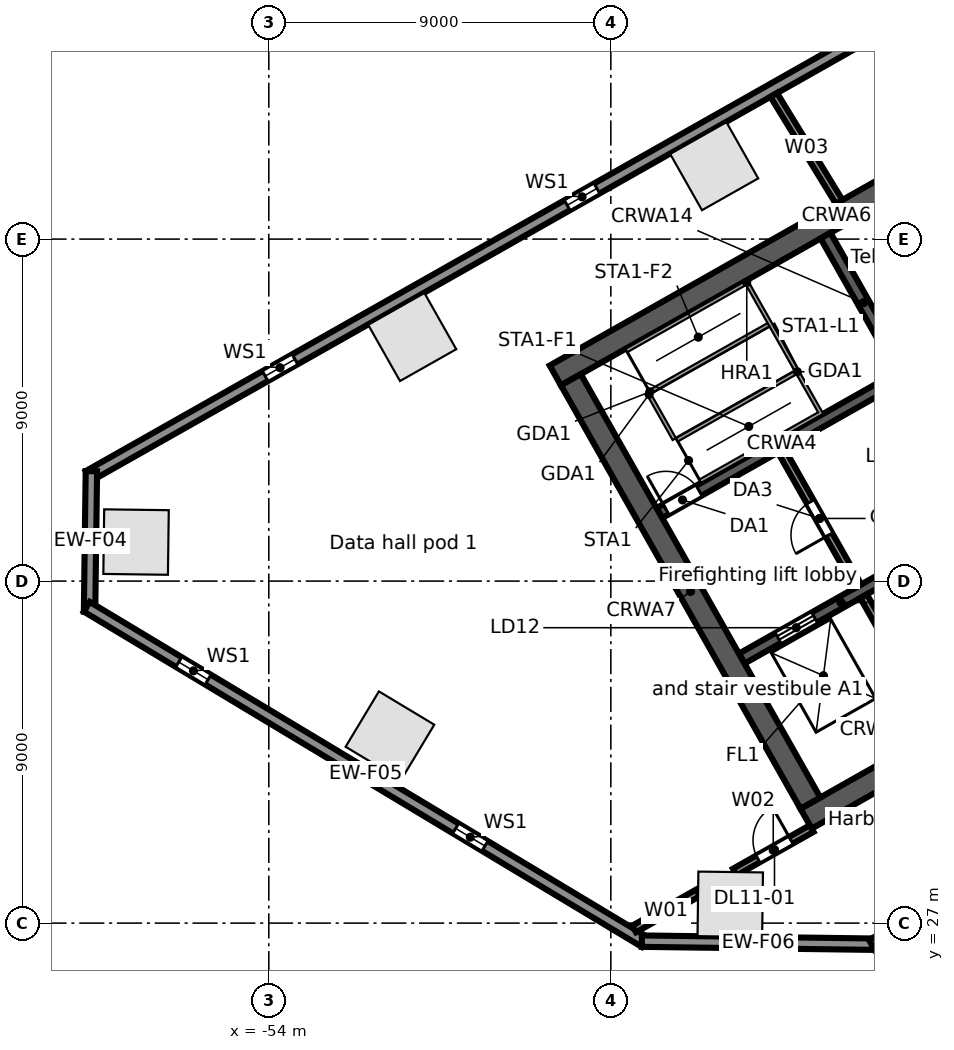
"""IFC4 building model, lengths in metres.
Left out: names, types, materials, properties, quantities, classifications, styles, units other than length and angle.
Written with IfcOpenShell. Run it as: python <this file> out.ifc"""

import sys

from ifc_helpers import new_model, si_unit, direction, frame, frame_2d, origin, origin_2d, place, context, subcontext, project, spatial, rectangle, extrude, element, fill, save


model = new_model("IFC4")
c1 = context("Model", 3, precision=1e-05, world=origin(), true_north=direction((0.0, 1.0)))
c2 = subcontext(c1, "Body", "Model", "MODEL_VIEW")
j1 = project(units=[si_unit("LENGTHUNIT", "METRE"), si_unit("PLANEANGLEUNIT", "RADIAN")], contexts=[c1])
p1 = place(None, origin())
s1 = spatial("IfcSite", under=j1, at=p1, CompositionType="ELEMENT")
p2 = place(p1, origin())
s2 = spatial("IfcBuilding", under=s1, at=p2, CompositionType="ELEMENT")
p3 = place(p2, frame((0.0, 0.0, 66.5)))
s3 = spatial("IfcBuildingStorey", under=s2, at=p3, CompositionType="ELEMENT", Elevation=66.5)
for number, where, z_axis, x_axis in (
    (1, (-42.28, 46.919, 0.0), (0.0, 0.0, 1.0), (-0.87, -0.492, 0.0)),
    (2, (-50.226, 42.423, 0.0), (0.0, 0.0, 1.0), (-0.87, -0.492, 0.0)),
    (3, (-57.493, 37.027, 0.0), (0.0, 0.0, 1.0), (-0.013, -1.0, 0.0)),
    (4, (-50.812, 31.931, 0.0), (0.0, 0.0, 1.0), (0.857, -0.515, 0.0)),
    (5, (-41.858, 27.495, 0.0), (0.0, 0.0, 1.0), (1.0, -0.013, 0.0)),
):
    element("IfcColumn", number, at=place(p3, frame(where, z_axis=z_axis, x_axis=x_axis)), inside=s3, PredefinedType="COLUMN", context=c2, shape_type="SweptSolid", body=[
        extrude(rectangle(XDim=1.7, YDim=1.7, at=origin_2d()), origin(), (0.0, 0.0, 1.0), 5.0),
    ])
p4 = place(p3, frame((-58.745, 38.764, 0.0), z_axis=(0.0, 0.0, 1.0), x_axis=(0.870355811726, 0.492423355453, 0.0)))
e6 = element("IfcWall", 6, at=p4, inside=s3, PredefinedType="STANDARD", context=c2, shape_type="SweptSolid", body=[
    extrude(rectangle(XDim=64.025, YDim=0.3, at=frame_2d((32.013, 0.0))), origin(), (0.0, 0.0, 1.0), 4.68),
])
p5 = place(p4, frame((60.122, 0.0, 0.6)))
e7 = element("IfcOpeningElement", 7, at=p5, cuts=e6, PredefinedType="OPENING", context=c2, shape_type="SweptSolid", body=[
    extrude(rectangle(XDim=0.9, YDim=3.2, at=frame_2d((0.45, 1.6))), frame((0.0, 0.16, 0.0), z_axis=(0.0, -1.0, 0.0), x_axis=(1.0, 0.0, 0.0)), (0.0, 0.0, 1.0), 0.32),
])
p6 = place(p4, frame((50.992, 0.0, 0.6)))
e8 = element("IfcOpeningElement", 8, at=p6, cuts=e6, PredefinedType="OPENING", context=c2, shape_type="SweptSolid", body=[
    extrude(rectangle(XDim=0.9, YDim=3.2, at=frame_2d((0.45, 1.6))), frame((0.0, 0.16, 0.0), z_axis=(0.0, -1.0, 0.0), x_axis=(1.0, 0.0, 0.0)), (0.0, 0.0, 1.0), 0.32),
])
p7 = place(p4, frame((41.862, 0.0, 0.6)))
e9 = element("IfcOpeningElement", 9, at=p7, cuts=e6, PredefinedType="OPENING", context=c2, shape_type="SweptSolid", body=[
    extrude(rectangle(XDim=0.9, YDim=3.2, at=frame_2d((0.45, 1.6))), frame((0.0, 0.16, 0.0), z_axis=(0.0, -1.0, 0.0), x_axis=(1.0, 0.0, 0.0)), (0.0, 0.0, 1.0), 0.32),
])
p8 = place(p4, frame((32.732, 0.0, 0.6)))
e10 = element("IfcOpeningElement", 10, at=p8, cuts=e6, PredefinedType="OPENING", context=c2, shape_type="SweptSolid", body=[
    extrude(rectangle(XDim=0.9, YDim=3.2, at=frame_2d((0.45, 1.6))), frame((0.0, 0.16, 0.0), z_axis=(0.0, -1.0, 0.0), x_axis=(1.0, 0.0, 0.0)), (0.0, 0.0, 1.0), 0.32),
])
p9 = place(p4, frame((23.602, 0.0, 0.6)))
e11 = element("IfcOpeningElement", 11, at=p9, cuts=e6, PredefinedType="OPENING", context=c2, shape_type="SweptSolid", body=[
    extrude(rectangle(XDim=0.9, YDim=3.2, at=frame_2d((0.45, 1.6))), frame((0.0, 0.16, 0.0), z_axis=(0.0, -1.0, 0.0), x_axis=(1.0, 0.0, 0.0)), (0.0, 0.0, 1.0), 0.32),
])
p10 = place(p4, frame((14.472, 0.0, 0.6)))
e12 = element("IfcOpeningElement", 12, at=p10, cuts=e6, PredefinedType="OPENING", context=c2, shape_type="SweptSolid", body=[
    extrude(rectangle(XDim=0.9, YDim=3.2, at=frame_2d((0.45, 1.6))), frame((0.0, 0.16, 0.0), z_axis=(0.0, -1.0, 0.0), x_axis=(1.0, 0.0, 0.0)), (0.0, 0.0, 1.0), 0.32),
])
p11 = place(p4, frame((5.342, 0.0, 0.6)))
e13 = element("IfcOpeningElement", 13, at=p11, cuts=e6, PredefinedType="OPENING", context=c2, shape_type="SweptSolid", body=[
    extrude(rectangle(XDim=0.9, YDim=3.2, at=frame_2d((0.45, 1.6))), frame((0.0, 0.16, 0.0), z_axis=(0.0, -1.0, 0.0), x_axis=(1.0, 0.0, 0.0)), (0.0, 0.0, 1.0), 0.32),
])
p12 = place(p3, frame((-58.717, 35.194, 0.0), z_axis=(0.0, 0.0, 1.0), x_axis=(0.013069053407, 0.999914596275, 0.0)))
e14 = element("IfcWall", 14, at=p12, inside=s3, PredefinedType="STANDARD", context=c2, shape_type="SweptSolid", body=[
    extrude(rectangle(XDim=3.699, YDim=0.3, at=frame_2d((1.849, 0.0))), origin(), (0.0, 0.0, 1.0), 4.68),
])
p13 = place(p3, frame((-44.109, 26.504, 0.0), z_axis=(0.0, 0.0, 1.0), x_axis=(-0.857169502585, 0.515034410344, 0.0)))
e15 = element("IfcWall", 15, at=p13, inside=s3, PredefinedType="STANDARD", context=c2, shape_type="SweptSolid", body=[
    extrude(rectangle(XDim=17.127, YDim=0.3, at=frame_2d((8.563, 0.0))), origin(), (0.0, 0.0, 1.0), 4.68),
])
p14 = place(p13, frame((13.403, 0.0, 0.6)))
e16 = element("IfcOpeningElement", 16, at=p14, cuts=e15, PredefinedType="OPENING", context=c2, shape_type="SweptSolid", body=[
    extrude(rectangle(XDim=0.9, YDim=3.2, at=frame_2d((0.45, 1.6))), frame((0.0, 0.16, 0.0), z_axis=(0.0, -1.0, 0.0), x_axis=(1.0, 0.0, 0.0)), (0.0, 0.0, 1.0), 0.32),
])
p15 = place(p13, frame((4.903, 0.0, 0.6)))
e17 = element("IfcOpeningElement", 17, at=p15, cuts=e15, PredefinedType="OPENING", context=c2, shape_type="SweptSolid", body=[
    extrude(rectangle(XDim=0.9, YDim=3.2, at=frame_2d((0.45, 1.6))), frame((0.0, 0.16, 0.0), z_axis=(0.0, -1.0, 0.0), x_axis=(1.0, 0.0, 0.0)), (0.0, 0.0, 1.0), 0.32),
])
p16 = place(p3, frame((-38.057, 26.445, 0.0), z_axis=(0.0, 0.0, 1.0), x_axis=(-0.999914086342, 0.013108010296, 0.0)))
e18 = element("IfcWall", 18, at=p16, inside=s3, PredefinedType="STANDARD", context=c2, shape_type="SweptSolid", body=[
    extrude(rectangle(XDim=6.128, YDim=0.3, at=frame_2d((3.064, 0.0))), origin(), (0.0, 0.0, 1.0), 4.68),
])
p17 = place(p3, frame((-0.055, 47.969, 0.0), z_axis=(0.0, 0.0, 1.0), x_axis=(-0.870355730478, -0.492423499058, 0.0)))
e19 = element("IfcWall", 19, at=p17, inside=s3, PredefinedType="STANDARD", context=c2, shape_type="SweptSolid", body=[
    extrude(rectangle(XDim=43.75, YDim=0.3, at=frame_2d((21.875, 0.0))), origin(), (0.0, 0.0, 1.0), 4.68),
])
p18 = place(p17, frame((39.977, 0.0, 0.6)))
e20 = element("IfcOpeningElement", 20, at=p18, cuts=e19, PredefinedType="OPENING", context=c2, shape_type="SweptSolid", body=[
    extrude(rectangle(XDim=0.9, YDim=3.2, at=frame_2d((0.45, 1.6))), frame((0.0, 0.16, 0.0), z_axis=(0.0, -1.0, 0.0), x_axis=(1.0, 0.0, 0.0)), (0.0, 0.0, 1.0), 0.32),
])
p19 = place(p17, frame((31.222, 0.0, 0.6)))
e21 = element("IfcOpeningElement", 21, at=p19, cuts=e19, PredefinedType="OPENING", context=c2, shape_type="SweptSolid", body=[
    extrude(rectangle(XDim=0.9, YDim=3.2, at=frame_2d((0.45, 1.6))), frame((0.0, 0.16, 0.0), z_axis=(0.0, -1.0, 0.0), x_axis=(1.0, 0.0, 0.0)), (0.0, 0.0, 1.0), 0.32),
])
p20 = place(p17, frame((22.468, 0.0, 0.6)))
e22 = element("IfcOpeningElement", 22, at=p20, cuts=e19, PredefinedType="OPENING", context=c2, shape_type="SweptSolid", body=[
    extrude(rectangle(XDim=0.9, YDim=3.2, at=frame_2d((0.45, 1.6))), frame((0.0, 0.16, 0.0), z_axis=(0.0, -1.0, 0.0), x_axis=(1.0, 0.0, 0.0)), (0.0, 0.0, 1.0), 0.32),
])
p21 = place(p17, frame((13.713, 0.0, 0.6)))
e23 = element("IfcOpeningElement", 23, at=p21, cuts=e19, PredefinedType="OPENING", context=c2, shape_type="SweptSolid", body=[
    extrude(rectangle(XDim=0.9, YDim=3.2, at=frame_2d((0.45, 1.6))), frame((0.0, 0.16, 0.0), z_axis=(0.0, -1.0, 0.0), x_axis=(1.0, 0.0, 0.0)), (0.0, 0.0, 1.0), 0.32),
])
p22 = place(p17, frame((4.959, 0.0, 0.6)))
e24 = element("IfcOpeningElement", 24, at=p22, cuts=e19, PredefinedType="OPENING", context=c2, shape_type="SweptSolid", body=[
    extrude(rectangle(XDim=0.9, YDim=3.2, at=frame_2d((0.45, 1.6))), frame((0.0, 0.16, 0.0), z_axis=(0.0, -1.0, 0.0), x_axis=(1.0, 0.0, 0.0)), (0.0, 0.0, 1.0), 0.32),
])
p23 = place(p3, frame((-39.862, 29.749, 0.0), z_axis=(0.0, 0.0, 1.0), x_axis=(0.870350116061, 0.492433422375, 0.0)))
e25 = element("IfcWall", 25, at=p23, inside=s3, PredefinedType="SOLIDWALL", context=c2, shape_type="SweptSolid", body=[
    extrude(rectangle(XDim=17.0, YDim=0.6, at=frame_2d((8.5, 0.0))), origin(), (0.0, 0.0, 1.0), 4.68),
])
p24 = place(p23, frame((7.2, 0.0, 0.0)))
e26 = element("IfcOpeningElement", 26, at=p24, cuts=e25, PredefinedType="OPENING", context=c2, shape_type="SweptSolid", body=[
    extrude(rectangle(XDim=1.2, YDim=2.1, at=frame_2d((0.6, 1.05))), frame((0.0, 0.31, 0.0), z_axis=(0.0, -1.0, 0.0), x_axis=(1.0, 0.0, 0.0)), (0.0, 0.0, 1.0), 0.62),
])
p25 = place(p3, frame((-41.556, 33.961, 0.0), z_axis=(0.0, 0.0, 1.0), x_axis=(0.870343731308, 0.492444706919, 0.0)))
e27 = element("IfcWall", 27, at=p25, inside=s3, PredefinedType="SOLIDWALL", context=c2, shape_type="SweptSolid", body=[
    extrude(rectangle(XDim=6.0, YDim=0.3, at=frame_2d((3.0, 0.0))), origin(), (0.0, 0.0, 1.0), 4.68),
])
p26 = place(p25, frame((1.1, 0.0, 0.0)))
e28 = element("IfcOpeningElement", 28, at=p26, cuts=e27, PredefinedType="OPENING", context=c2, shape_type="SweptSolid", body=[
    extrude(rectangle(XDim=1.1, YDim=2.1, at=frame_2d((0.55, 1.05))), frame((0.0, 0.16, 0.0), z_axis=(0.0, -1.0, 0.0), x_axis=(1.0, 0.0, 0.0)), (0.0, 0.0, 1.0), 0.32),
])
p27 = place(p25, frame((4.25, 0.0, 0.0)))
e29 = element("IfcOpeningElement", 29, at=p27, cuts=e27, PredefinedType="OPENING", context=c2, shape_type="SweptSolid", body=[
    extrude(rectangle(XDim=1.1, YDim=2.1, at=frame_2d((0.55, 1.05))), frame((0.0, 0.16, 0.0), z_axis=(0.0, -1.0, 0.0), x_axis=(1.0, 0.0, 0.0)), (0.0, 0.0, 1.0), 0.32),
])
p28 = place(p3, frame((-43.723, 37.791, 0.0), z_axis=(0.0, 0.0, 1.0), x_axis=(0.87035077051, 0.49243226567, 0.0)))
e30 = element("IfcWall", 30, at=p28, inside=s3, PredefinedType="SOLIDWALL", context=c2, shape_type="SweptSolid", body=[
    extrude(rectangle(XDim=7.4, YDim=0.3, at=frame_2d((3.7, 0.0))), origin(), (0.0, 0.0, 1.0), 4.68),
])
p29 = place(p28, frame((0.2, 0.0, 0.0)))
e31 = element("IfcOpeningElement", 31, at=p29, cuts=e30, PredefinedType="OPENING", context=c2, shape_type="SweptSolid", body=[
    extrude(rectangle(XDim=1.0, YDim=2.1, at=frame_2d((0.5, 1.05))), frame((0.0, 0.16, 0.0), z_axis=(0.0, -1.0, 0.0), x_axis=(1.0, 0.0, 0.0)), (0.0, 0.0, 1.0), 0.32),
])
p30 = place(p3, frame((-46.461, 41.412, 0.0), z_axis=(0.0, 0.0, 1.0), x_axis=(0.870350116061, 0.492433422375, 0.0)))
e32 = element("IfcWall", 32, at=p30, inside=s3, PredefinedType="SOLIDWALL", context=c2, shape_type="SweptSolid", body=[
    extrude(rectangle(XDim=17.0, YDim=0.6, at=frame_2d((8.5, 0.0))), origin(), (0.0, 0.0, 1.0), 4.68),
])
p31 = place(p3, frame((-46.052, 41.298, 0.0), z_axis=(0.0, 0.0, 1.0), x_axis=(0.492418598281, -0.870358503186, 0.0)))
e33 = element("IfcWall", 33, at=p31, inside=s3, PredefinedType="SOLIDWALL", context=c2, shape_type="SweptSolid", body=[
    extrude(rectangle(XDim=12.8, YDim=0.6, at=frame_2d((6.4, 0.0))), origin(), (0.0, 0.0, 1.0), 4.68),
])
p32 = place(p3, frame((-38.349, 35.603, 0.0), z_axis=(0.0, 0.0, 1.0), x_axis=(0.49241474071, -0.870360685654, 0.0)))
e34 = element("IfcWall", 34, at=p32, inside=s3, PredefinedType="SOLIDWALL", context=c2, shape_type="SweptSolid", body=[
    extrude(rectangle(XDim=4.05, YDim=0.2, at=frame_2d((2.025, 0.0))), origin(), (0.0, 0.0, 1.0), 4.68),
])
p33 = place(p3, frame((-40.516, 39.433, 0.0), z_axis=(0.0, 0.0, 1.0), x_axis=(0.492453559952, -0.87033872216, 0.0)))
e35 = element("IfcWall", 35, at=p33, inside=s3, PredefinedType="PARTITIONING", context=c2, shape_type="SweptSolid", body=[
    extrude(rectangle(XDim=4.1, YDim=0.2, at=frame_2d((2.05, 0.0))), origin(), (0.0, 0.0, 1.0), 4.68),
])
p34 = place(p33, frame((1.55, 0.0, 0.0)))
e36 = element("IfcOpeningElement", 36, at=p34, cuts=e35, PredefinedType="OPENING", context=c2, shape_type="SweptSolid", body=[
    extrude(rectangle(XDim=1.0, YDim=2.1, at=frame_2d((0.5, 1.05))), frame((0.0, 0.11, 0.0), z_axis=(0.0, -1.0, 0.0), x_axis=(1.0, 0.0, 0.0)), (0.0, 0.0, 1.0), 0.22),
])
p35 = place(p3, frame((-39.35, 45.09, 0.0), z_axis=(0.0, 0.0, 1.0), x_axis=(0.49241474071, -0.870360685654, 0.0)))
e37 = element("IfcWall", 37, at=p35, inside=s3, PredefinedType="SOLIDWALL", context=c2, shape_type="SweptSolid", body=[
    extrude(rectangle(XDim=4.05, YDim=0.3, at=frame_2d((2.025, 0.0))), origin(), (0.0, 0.0, 1.0), 4.68),
])
p36 = place(p3, frame((-44.386, 26.845, 0.0), z_axis=(0.0, 0.0, 1.0), x_axis=(0.870226201187, 0.492652371118, 0.0)))
e38 = element("IfcWall", 38, at=p36, inside=s3, PredefinedType="PARTITIONING", context=c2, shape_type="SweptSolid", body=[
    extrude(rectangle(XDim=1.933, YDim=0.2, at=frame_2d((0.966, 0.0))), origin(), (0.0, 0.0, 1.0), 4.68),
])
p37 = place(p3, frame((-41.738, 28.343, 0.0), z_axis=(0.0, 0.0, 1.0), x_axis=(0.870265350095, 0.492583211676, 0.0)))
e39 = element("IfcWall", 39, at=p37, inside=s3, PredefinedType="PARTITIONING", context=c2, shape_type="SweptSolid", body=[
    extrude(rectangle(XDim=2.324, YDim=0.2, at=frame_2d((1.162, 0.0))), origin(), (0.0, 0.0, 1.0), 4.68),
])
p38 = place(p37, frame((0.7, 0.0, 0.0)))
e40 = element("IfcOpeningElement", 40, at=p38, cuts=e39, PredefinedType="OPENING", context=c2, shape_type="SweptSolid", body=[
    extrude(rectangle(XDim=1.0, YDim=2.1, at=frame_2d((0.5, 1.05))), frame((0.0, 0.11, 0.0), z_axis=(0.0, -1.0, 0.0), x_axis=(1.0, 0.0, 0.0)), (0.0, 0.0, 1.0), 0.22),
])
p39 = place(p3, frame((-40.713, 48.794, 0.0), z_axis=(0.0, 0.0, 1.0), x_axis=(0.52165366254, -0.853157345604, 0.0)))
e41 = element("IfcWall", 41, at=p39, inside=s3, PredefinedType="PARTITIONING", context=c2, shape_type="SweptSolid", body=[
    extrude(rectangle(XDim=3.297, YDim=0.2, at=frame_2d((1.648, 0.0))), origin(), (0.0, 0.0, 1.0), 3.96),
])
p40 = place(p10, origin())
e42 = element("IfcWindow", 42, at=p40, inside=s3, PartitioningType="SINGLE_PANEL", PredefinedType="WINDOW", context=c2, shape_type="SweptSolid", body=[
    extrude(rectangle(XDim=0.9, YDim=3.2, at=frame_2d((0.45, 1.6))), frame((0.0, 0.03, 0.0), z_axis=(0.0, -1.0, 0.0), x_axis=(1.0, 0.0, 0.0)), (0.0, 0.0, 1.0), 0.06),
])
fill(e12, e42)
p41 = place(p11, origin())
e43 = element("IfcWindow", 43, at=p41, inside=s3, PartitioningType="SINGLE_PANEL", PredefinedType="WINDOW", context=c2, shape_type="SweptSolid", body=[
    extrude(rectangle(XDim=0.9, YDim=3.2, at=frame_2d((0.45, 1.6))), frame((0.0, 0.03, 0.0), z_axis=(0.0, -1.0, 0.0), x_axis=(1.0, 0.0, 0.0)), (0.0, 0.0, 1.0), 0.06),
])
fill(e13, e43)
p42 = place(p14, origin())
e44 = element("IfcWindow", 44, at=p42, inside=s3, PartitioningType="SINGLE_PANEL", PredefinedType="WINDOW", context=c2, shape_type="SweptSolid", body=[
    extrude(rectangle(XDim=0.9, YDim=3.2, at=frame_2d((0.45, 1.6))), frame((0.0, 0.03, 0.0), z_axis=(0.0, -1.0, 0.0), x_axis=(1.0, 0.0, 0.0)), (0.0, 0.0, 1.0), 0.06),
])
fill(e16, e44)
p43 = place(p15, origin())
e45 = element("IfcWindow", 45, at=p43, inside=s3, PartitioningType="SINGLE_PANEL", PredefinedType="WINDOW", context=c2, shape_type="SweptSolid", body=[
    extrude(rectangle(XDim=0.9, YDim=3.2, at=frame_2d((0.45, 1.6))), frame((0.0, 0.03, 0.0), z_axis=(0.0, -1.0, 0.0), x_axis=(1.0, 0.0, 0.0)), (0.0, 0.0, 1.0), 0.06),
])
fill(e17, e45)
p44 = place(p26, origin())
e46 = element("IfcDoor", 46, at=p44, inside=s3, OperationType="DOUBLE_DOOR_SLIDING", PredefinedType="DOOR", context=c2, shape_type="SweptSolid", body=[
    extrude(rectangle(XDim=1.1, YDim=2.1, at=frame_2d((0.55, 1.05))), frame((0.0, 0.025, 0.0), z_axis=(0.0, -1.0, 0.0), x_axis=(1.0, 0.0, 0.0)), (0.0, 0.0, 1.0), 0.05),
])
fill(e28, e46)
p45 = place(p29, origin())
e47 = element("IfcDoor", 47, at=p45, inside=s3, OperationType="SINGLE_SWING_LEFT", PredefinedType="DOOR", context=c2, shape_type="SweptSolid", body=[
    extrude(rectangle(XDim=1.0, YDim=2.1, at=frame_2d((0.5, 1.05))), frame((0.0, 0.025, 0.0), z_axis=(0.0, -1.0, 0.0), x_axis=(1.0, 0.0, 0.0)), (0.0, 0.0, 1.0), 0.05),
])
fill(e31, e47)
p46 = place(p34, frame((1.0, 0.0, 0.0), z_axis=(0.0, 0.0, 1.0), x_axis=(-1.0, 0.0, 0.0)))
e48 = element("IfcDoor", 48, at=p46, inside=s3, OperationType="SINGLE_SWING_LEFT", PredefinedType="DOOR", context=c2, shape_type="SweptSolid", body=[
    extrude(rectangle(XDim=1.0, YDim=2.1, at=frame_2d((0.5, 1.05))), frame((0.0, 0.025, 0.0), z_axis=(0.0, -1.0, 0.0), x_axis=(1.0, 0.0, 0.0)), (0.0, 0.0, 1.0), 0.05),
])
fill(e36, e48)
p47 = place(p38, origin())
e49 = element("IfcDoor", 49, at=p47, inside=s3, OperationType="SINGLE_SWING_RIGHT", PredefinedType="DOOR", context=c2, shape_type="SweptSolid", body=[
    extrude(rectangle(XDim=1.0, YDim=2.1, at=frame_2d((0.5, 1.05))), frame((0.0, 0.025, 0.0), z_axis=(0.0, -1.0, 0.0), x_axis=(1.0, 0.0, 0.0)), (0.0, 0.0, 1.0), 0.05),
])
fill(e40, e49)
save(model, sys.argv[1])
